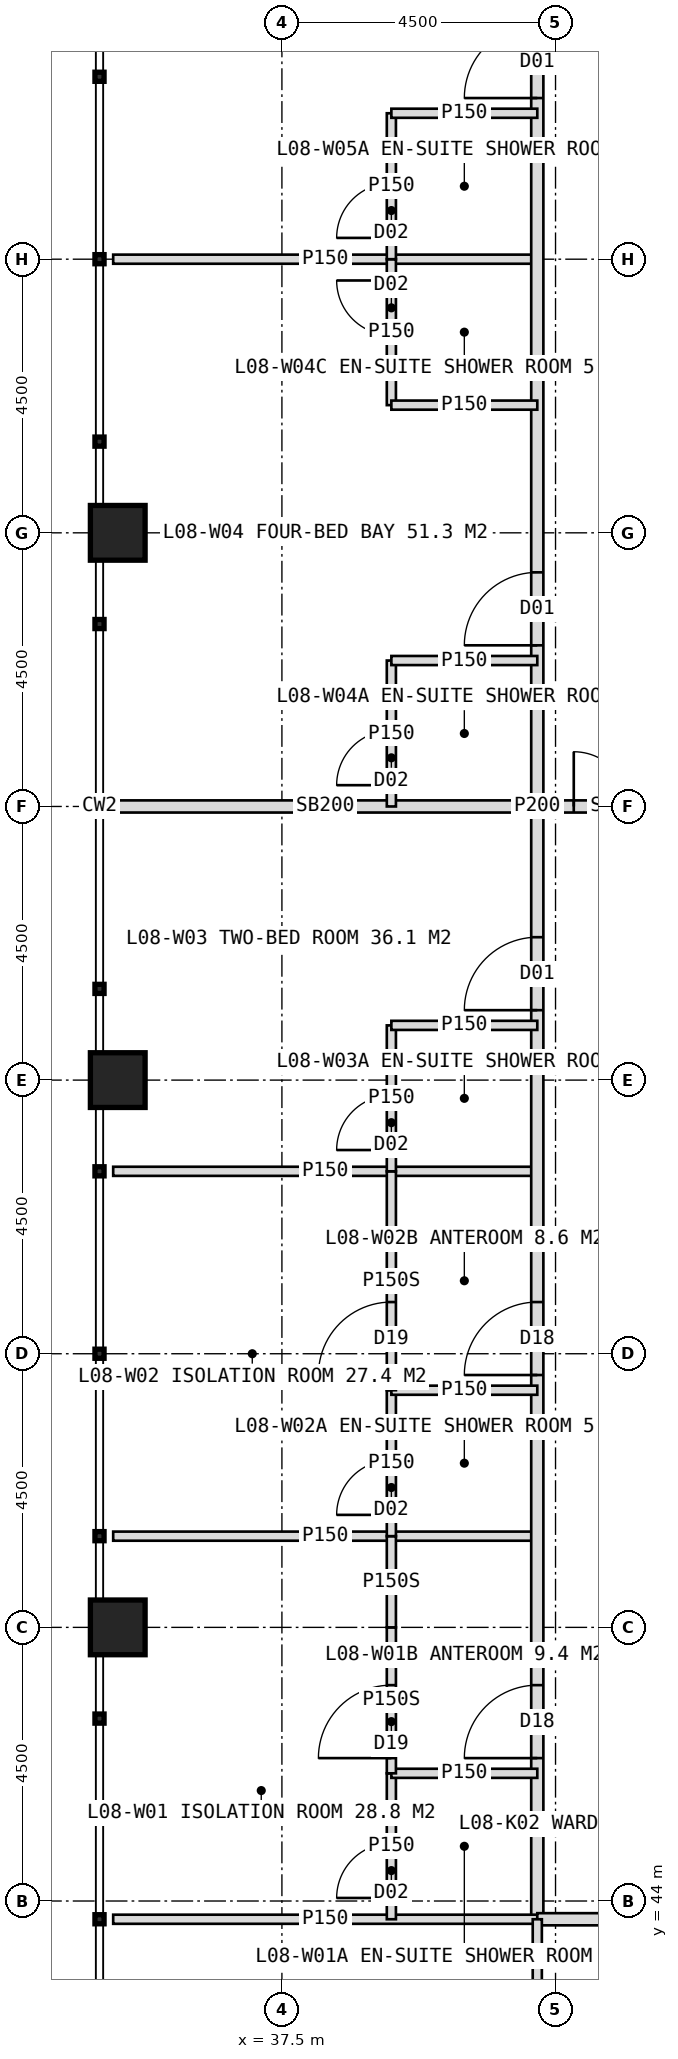
"""IFC4 building model, lengths in metres.
Left out: names, types, materials, properties, quantities, classifications, styles, units other than length and angle.
Written with IfcOpenShell. Run it as: python <this file> out.ifc"""

import sys

from ifc_helpers import new_model, si_unit, direction, frame, frame_2d, origin, origin_2d, place, context, subcontext, project, spatial, rectangle, hollow_rectangle, extrude, element, fill, save


model = new_model("IFC4")
c1 = context("Model", 3, precision=1e-05, world=origin(), true_north=direction((0.0, 1.0)))
c2 = subcontext(c1, "Body", "Model", "MODEL_VIEW")
j1 = project(units=[si_unit("LENGTHUNIT", "METRE"), si_unit("PLANEANGLEUNIT", "RADIAN")], contexts=[c1])
p1 = place(None, origin())
s1 = spatial("IfcSite", under=j1, at=p1, CompositionType="ELEMENT")
p2 = place(p1, origin())
s2 = spatial("IfcBuilding", under=s1, at=p2, CompositionType="ELEMENT")
p3 = place(p2, frame((0.0, 0.0, 39.0)))
s3 = spatial("IfcBuildingStorey", under=s2, at=p3, CompositionType="ELEMENT", Elevation=39.0)
for number, where, z_axis, x_axis in (
    (1, (34.8, 48.5, 0.0), (0.0, 0.0, 1.0), (1.0, 0.0, 0.0)),
    (2, (34.8, 57.5, 0.0), (0.0, 0.0, 1.0), (1.0, 0.0, 0.0)),
    (3, (34.8, 66.5, 0.0), (0.0, 0.0, 1.0), (1.0, 0.0, 0.0)),
):
    element("IfcColumn", number, at=place(p3, frame(where, z_axis=z_axis, x_axis=x_axis)), inside=s3, PredefinedType="COLUMN", context=c2, shape_type="SweptSolid", body=[
        extrude(hollow_rectangle(XDim=0.9, YDim=0.9, WallThickness=0.08, at=origin_2d()), origin(), (0.0, 0.0, 1.0), 4.0),
    ])
for number, where, z_axis, x_axis in (
    (4, (41.7, 50.0, 0.0), (0.0, 0.0, 1.0), (-1.0, 0.0, 0.0)),
    (5, (41.7, 56.0, 0.0), (0.0, 0.0, 1.0), (-1.0, 0.0, 0.0)),
):
    element("IfcWall", number, at=place(p3, frame(where, z_axis=z_axis, x_axis=x_axis)), inside=s3, PredefinedType="PARTITIONING", context=c2, shape_type="SweptSolid", body=[
        extrude(rectangle(XDim=6.975, YDim=0.15, at=frame_2d((3.487, 0.0))), origin(), (0.0, 0.0, 1.0), 3.75),
    ])
p4 = place(p3, frame((41.7, 62.0, 0.0), z_axis=(0.0, 0.0, 1.0), x_axis=(-1.0, 0.0, 0.0)))
e6 = element("IfcWall", 6, at=p4, inside=s3, PredefinedType="SOLIDWALL", context=c2, shape_type="SweptSolid", body=[
    extrude(rectangle(XDim=6.975, YDim=0.2, at=frame_2d((3.487, 0.0))), origin(), (0.0, 0.0, 1.0), 2.75),
])
p5 = place(p3, frame((41.7, 71.0, 0.0), z_axis=(0.0, 0.0, 1.0), x_axis=(-1.0, 0.0, 0.0)))
e7 = element("IfcWall", 7, at=p5, inside=s3, PredefinedType="PARTITIONING", context=c2, shape_type="SweptSolid", body=[
    extrude(rectangle(XDim=6.975, YDim=0.15, at=frame_2d((3.487, 0.0))), origin(), (0.0, 0.0, 1.0), 3.75),
])
p6 = place(p3, frame((41.7, 43.7, 0.0), z_axis=(0.0, 0.0, 1.0), x_axis=(0.0, 1.0, 0.0)))
e8 = element("IfcWall", 8, at=p6, inside=s3, PredefinedType="PARTITIONING", context=c2, shape_type="SweptSolid", body=[
    extrude(rectangle(XDim=36.6, YDim=0.2, at=frame_2d((18.3, 0.0))), origin(), (0.0, 0.0, 1.0), 3.75),
])
p7 = place(p6, frame((2.65, 0.0, 0.0)))
e9 = element("IfcOpeningElement", 9, at=p7, cuts=e8, PredefinedType="OPENING", context=c2, shape_type="SweptSolid", body=[
    extrude(rectangle(XDim=1.2, YDim=2.2, at=frame_2d((0.6, 1.1))), frame((0.0, 0.11, 0.0), z_axis=(0.0, -1.0, 0.0), x_axis=(1.0, 0.0, 0.0)), (0.0, 0.0, 1.0), 0.22),
])
p8 = place(p6, frame((8.95, 0.0, 0.0)))
e10 = element("IfcOpeningElement", 10, at=p8, cuts=e8, PredefinedType="OPENING", context=c2, shape_type="SweptSolid", body=[
    extrude(rectangle(XDim=1.2, YDim=2.2, at=frame_2d((0.6, 1.1))), frame((0.0, 0.11, 0.0), z_axis=(0.0, -1.0, 0.0), x_axis=(1.0, 0.0, 0.0)), (0.0, 0.0, 1.0), 0.22),
])
p9 = place(p6, frame((14.95, 0.0, 0.0)))
e11 = element("IfcOpeningElement", 11, at=p9, cuts=e8, PredefinedType="OPENING", context=c2, shape_type="SweptSolid", body=[
    extrude(rectangle(XDim=1.2, YDim=2.2, at=frame_2d((0.6, 1.1))), frame((0.0, 0.11, 0.0), z_axis=(0.0, -1.0, 0.0), x_axis=(1.0, 0.0, 0.0)), (0.0, 0.0, 1.0), 0.22),
])
p10 = place(p6, frame((20.95, 0.0, 0.0)))
e12 = element("IfcOpeningElement", 12, at=p10, cuts=e8, PredefinedType="OPENING", context=c2, shape_type="SweptSolid", body=[
    extrude(rectangle(XDim=1.2, YDim=2.2, at=frame_2d((0.6, 1.1))), frame((0.0, 0.11, 0.0), z_axis=(0.0, -1.0, 0.0), x_axis=(1.0, 0.0, 0.0)), (0.0, 0.0, 1.0), 0.22),
])
p11 = place(p6, frame((29.95, 0.0, 0.0)))
e13 = element("IfcOpeningElement", 13, at=p11, cuts=e8, PredefinedType="OPENING", context=c2, shape_type="SweptSolid", body=[
    extrude(rectangle(XDim=1.2, YDim=2.2, at=frame_2d((0.6, 1.1))), frame((0.0, 0.11, 0.0), z_axis=(0.0, -1.0, 0.0), x_axis=(1.0, 0.0, 0.0)), (0.0, 0.0, 1.0), 0.22),
])
p12 = place(p3, frame((41.7, 43.7, 0.0), z_axis=(0.0, 0.0, 1.0), x_axis=(-1.0, 0.0, 0.0)))
e14 = element("IfcWall", 14, at=p12, inside=s3, PredefinedType="PARTITIONING", context=c2, shape_type="SweptSolid", body=[
    extrude(rectangle(XDim=6.975, YDim=0.15, at=frame_2d((3.487, 0.0))), origin(), (0.0, 0.0, 1.0), 3.75),
])
p13 = place(p3, frame((39.3, 43.7, 0.0), z_axis=(0.0, 0.0, 1.0), x_axis=(0.0, 1.0, 0.0)))
e15 = element("IfcWall", 15, at=p13, inside=s3, PredefinedType="PARTITIONING", context=c2, shape_type="SweptSolid", body=[
    extrude(rectangle(XDim=2.4, YDim=0.15, at=frame_2d((1.2, 0.0))), origin(), (0.0, 0.0, 1.0), 2.95),
])
p14 = place(p13, frame((0.35, 0.0, 0.0)))
e16 = element("IfcOpeningElement", 16, at=p14, cuts=e15, PredefinedType="OPENING", context=c2, shape_type="SweptSolid", body=[
    extrude(rectangle(XDim=0.9, YDim=2.1, at=frame_2d((0.45, 1.05))), frame((0.0, 0.085, 0.0), z_axis=(0.0, -1.0, 0.0), x_axis=(1.0, 0.0, 0.0)), (0.0, 0.0, 1.0), 0.17),
])
p15 = place(p3, frame((41.7, 46.1, 0.0), z_axis=(0.0, 0.0, 1.0), x_axis=(-1.0, 0.0, 0.0)))
e17 = element("IfcWall", 17, at=p15, inside=s3, PredefinedType="PARTITIONING", context=c2, shape_type="SweptSolid", body=[
    extrude(rectangle(XDim=2.4, YDim=0.15, at=frame_2d((1.2, 0.0))), origin(), (0.0, 0.0, 1.0), 3.75),
])
p16 = place(p3, frame((39.3, 46.1, 0.0), z_axis=(0.0, 0.0, 1.0), x_axis=(0.0, 1.0, 0.0)))
e18 = element("IfcWall", 18, at=p16, inside=s3, PredefinedType="PARTITIONING", context=c2, shape_type="SweptSolid", body=[
    extrude(rectangle(XDim=2.4, YDim=0.15, at=frame_2d((1.2, 0.0))), origin(), (0.0, 0.0, 1.0), 2.95),
])
p17 = place(p16, frame((0.25, 0.0, 0.0)))
e19 = element("IfcOpeningElement", 19, at=p17, cuts=e18, PredefinedType="OPENING", context=c2, shape_type="SweptSolid", body=[
    extrude(rectangle(XDim=1.2, YDim=2.2, at=frame_2d((0.6, 1.1))), frame((0.0, 0.085, 0.0), z_axis=(0.0, -1.0, 0.0), x_axis=(1.0, 0.0, 0.0)), (0.0, 0.0, 1.0), 0.17),
])
p18 = place(p3, frame((39.3, 48.5, 0.0), z_axis=(0.0, 0.0, 1.0), x_axis=(0.0, 1.0, 0.0)))
e20 = element("IfcWall", 20, at=p18, inside=s3, PredefinedType="PARTITIONING", context=c2, shape_type="SweptSolid", body=[
    extrude(rectangle(XDim=1.5, YDim=0.15, at=frame_2d((0.75, 0.0))), origin(), (0.0, 0.0, 1.0), 3.75),
])
p19 = place(p3, frame((39.3, 50.0, 0.0), z_axis=(0.0, 0.0, 1.0), x_axis=(0.0, 1.0, 0.0)))
e21 = element("IfcWall", 21, at=p19, inside=s3, PredefinedType="PARTITIONING", context=c2, shape_type="SweptSolid", body=[
    extrude(rectangle(XDim=2.4, YDim=0.15, at=frame_2d((1.2, 0.0))), origin(), (0.0, 0.0, 1.0), 3.75),
])
p20 = place(p19, frame((0.35, 0.0, 0.0)))
e22 = element("IfcOpeningElement", 22, at=p20, cuts=e21, PredefinedType="OPENING", context=c2, shape_type="SweptSolid", body=[
    extrude(rectangle(XDim=0.9, YDim=2.1, at=frame_2d((0.45, 1.05))), frame((0.0, 0.085, 0.0), z_axis=(0.0, -1.0, 0.0), x_axis=(1.0, 0.0, 0.0)), (0.0, 0.0, 1.0), 0.17),
])
p21 = place(p3, frame((41.7, 52.4, 0.0), z_axis=(0.0, 0.0, 1.0), x_axis=(-1.0, 0.0, 0.0)))
e23 = element("IfcWall", 23, at=p21, inside=s3, PredefinedType="PARTITIONING", context=c2, shape_type="SweptSolid", body=[
    extrude(rectangle(XDim=2.4, YDim=0.15, at=frame_2d((1.2, 0.0))), origin(), (0.0, 0.0, 1.0), 3.75),
])
p22 = place(p3, frame((39.3, 52.4, 0.0), z_axis=(0.0, 0.0, 1.0), x_axis=(0.0, 1.0, 0.0)))
e24 = element("IfcWall", 24, at=p22, inside=s3, PredefinedType="PARTITIONING", context=c2, shape_type="SweptSolid", body=[
    extrude(rectangle(XDim=3.6, YDim=0.15, at=frame_2d((1.8, 0.0))), origin(), (0.0, 0.0, 1.0), 3.75),
])
p23 = place(p22, frame((0.25, 0.0, 0.0)))
e25 = element("IfcOpeningElement", 25, at=p23, cuts=e24, PredefinedType="OPENING", context=c2, shape_type="SweptSolid", body=[
    extrude(rectangle(XDim=1.2, YDim=2.2, at=frame_2d((0.6, 1.1))), frame((0.0, 0.085, 0.0), z_axis=(0.0, -1.0, 0.0), x_axis=(1.0, 0.0, 0.0)), (0.0, 0.0, 1.0), 0.17),
])
p24 = place(p3, frame((39.3, 56.0, 0.0), z_axis=(0.0, 0.0, 1.0), x_axis=(0.0, 1.0, 0.0)))
e26 = element("IfcWall", 26, at=p24, inside=s3, PredefinedType="PARTITIONING", context=c2, shape_type="SweptSolid", body=[
    extrude(rectangle(XDim=2.4, YDim=0.15, at=frame_2d((1.2, 0.0))), origin(), (0.0, 0.0, 1.0), 3.75),
])
p25 = place(p24, frame((0.35, 0.0, 0.0)))
e27 = element("IfcOpeningElement", 27, at=p25, cuts=e26, PredefinedType="OPENING", context=c2, shape_type="SweptSolid", body=[
    extrude(rectangle(XDim=0.9, YDim=2.1, at=frame_2d((0.45, 1.05))), frame((0.0, 0.085, 0.0), z_axis=(0.0, -1.0, 0.0), x_axis=(1.0, 0.0, 0.0)), (0.0, 0.0, 1.0), 0.17),
])
p26 = place(p3, frame((41.7, 58.4, 0.0), z_axis=(0.0, 0.0, 1.0), x_axis=(-1.0, 0.0, 0.0)))
e28 = element("IfcWall", 28, at=p26, inside=s3, PredefinedType="PARTITIONING", context=c2, shape_type="SweptSolid", body=[
    extrude(rectangle(XDim=2.4, YDim=0.15, at=frame_2d((1.2, 0.0))), origin(), (0.0, 0.0, 1.0), 3.75),
])
p27 = place(p3, frame((39.3, 62.0, 0.0), z_axis=(0.0, 0.0, 1.0), x_axis=(0.0, 1.0, 0.0)))
e29 = element("IfcWall", 29, at=p27, inside=s3, PredefinedType="PARTITIONING", context=c2, shape_type="SweptSolid", body=[
    extrude(rectangle(XDim=2.4, YDim=0.15, at=frame_2d((1.2, 0.0))), origin(), (0.0, 0.0, 1.0), 3.75),
])
p28 = place(p27, frame((0.35, 0.0, 0.0)))
e30 = element("IfcOpeningElement", 30, at=p28, cuts=e29, PredefinedType="OPENING", context=c2, shape_type="SweptSolid", body=[
    extrude(rectangle(XDim=0.9, YDim=2.1, at=frame_2d((0.45, 1.05))), frame((0.0, 0.085, 0.0), z_axis=(0.0, -1.0, 0.0), x_axis=(1.0, 0.0, 0.0)), (0.0, 0.0, 1.0), 0.17),
])
p29 = place(p3, frame((41.7, 64.4, 0.0), z_axis=(0.0, 0.0, 1.0), x_axis=(-1.0, 0.0, 0.0)))
e31 = element("IfcWall", 31, at=p29, inside=s3, PredefinedType="PARTITIONING", context=c2, shape_type="SweptSolid", body=[
    extrude(rectangle(XDim=2.4, YDim=0.15, at=frame_2d((1.2, 0.0))), origin(), (0.0, 0.0, 1.0), 3.75),
])
p30 = place(p3, frame((39.3, 68.6, 0.0), z_axis=(0.0, 0.0, 1.0), x_axis=(0.0, 1.0, 0.0)))
e32 = element("IfcWall", 32, at=p30, inside=s3, PredefinedType="PARTITIONING", context=c2, shape_type="SweptSolid", body=[
    extrude(rectangle(XDim=2.4, YDim=0.15, at=frame_2d((1.2, 0.0))), origin(), (0.0, 0.0, 1.0), 3.75),
])
p31 = place(p30, frame((1.15, 0.0, 0.0)))
e33 = element("IfcOpeningElement", 33, at=p31, cuts=e32, PredefinedType="OPENING", context=c2, shape_type="SweptSolid", body=[
    extrude(rectangle(XDim=0.9, YDim=2.1, at=frame_2d((0.45, 1.05))), frame((0.0, 0.085, 0.0), z_axis=(0.0, -1.0, 0.0), x_axis=(1.0, 0.0, 0.0)), (0.0, 0.0, 1.0), 0.17),
])
p32 = place(p3, frame((41.7, 68.6, 0.0), z_axis=(0.0, 0.0, 1.0), x_axis=(-1.0, 0.0, 0.0)))
e34 = element("IfcWall", 34, at=p32, inside=s3, PredefinedType="PARTITIONING", context=c2, shape_type="SweptSolid", body=[
    extrude(rectangle(XDim=2.4, YDim=0.15, at=frame_2d((1.2, 0.0))), origin(), (0.0, 0.0, 1.0), 3.75),
])
p33 = place(p3, frame((39.3, 71.0, 0.0), z_axis=(0.0, 0.0, 1.0), x_axis=(0.0, 1.0, 0.0)))
e35 = element("IfcWall", 35, at=p33, inside=s3, PredefinedType="PARTITIONING", context=c2, shape_type="SweptSolid", body=[
    extrude(rectangle(XDim=2.4, YDim=0.15, at=frame_2d((1.2, 0.0))), origin(), (0.0, 0.0, 1.0), 3.75),
])
p34 = place(p33, frame((0.35, 0.0, 0.0)))
e36 = element("IfcOpeningElement", 36, at=p34, cuts=e35, PredefinedType="OPENING", context=c2, shape_type="SweptSolid", body=[
    extrude(rectangle(XDim=0.9, YDim=2.1, at=frame_2d((0.45, 1.05))), frame((0.0, 0.085, 0.0), z_axis=(0.0, -1.0, 0.0), x_axis=(1.0, 0.0, 0.0)), (0.0, 0.0, 1.0), 0.17),
])
p35 = place(p3, frame((41.7, 73.4, 0.0), z_axis=(0.0, 0.0, 1.0), x_axis=(-1.0, 0.0, 0.0)))
e37 = element("IfcWall", 37, at=p35, inside=s3, PredefinedType="PARTITIONING", context=c2, shape_type="SweptSolid", body=[
    extrude(rectangle(XDim=2.4, YDim=0.15, at=frame_2d((1.2, 0.0))), origin(), (0.0, 0.0, 1.0), 3.75),
])
p36 = place(p3, frame((78.3, 43.7, 0.0), z_axis=(0.0, 0.0, 1.0), x_axis=(-1.0, 0.0, 0.0)))
e38 = element("IfcWall", 38, at=p36, inside=s3, PredefinedType="PARTITIONING", context=c2, shape_type="SweptSolid", body=[
    extrude(rectangle(XDim=36.6, YDim=0.2, at=frame_2d((18.3, 0.0))), origin(), (0.0, 0.0, 1.0), 3.75),
])
p37 = place(p36, frame((2.65, 0.0, 0.0)))
e39 = element("IfcOpeningElement", 39, at=p37, cuts=e38, PredefinedType="OPENING", context=c2, shape_type="SweptSolid", body=[
    extrude(rectangle(XDim=1.2, YDim=2.2, at=frame_2d((0.6, 1.1))), frame((0.0, 0.11, 0.0), z_axis=(0.0, -1.0, 0.0), x_axis=(1.0, 0.0, 0.0)), (0.0, 0.0, 1.0), 0.22),
])
p38 = place(p36, frame((11.95, 0.0, 0.0)))
e40 = element("IfcOpeningElement", 40, at=p38, cuts=e38, PredefinedType="OPENING", context=c2, shape_type="SweptSolid", body=[
    extrude(rectangle(XDim=1.2, YDim=2.2, at=frame_2d((0.6, 1.1))), frame((0.0, 0.11, 0.0), z_axis=(0.0, -1.0, 0.0), x_axis=(1.0, 0.0, 0.0)), (0.0, 0.0, 1.0), 0.22),
])
p39 = place(p36, frame((20.95, 0.0, 0.0)))
e41 = element("IfcOpeningElement", 41, at=p39, cuts=e38, PredefinedType="OPENING", context=c2, shape_type="SweptSolid", body=[
    extrude(rectangle(XDim=1.2, YDim=2.2, at=frame_2d((0.6, 1.1))), frame((0.0, 0.11, 0.0), z_axis=(0.0, -1.0, 0.0), x_axis=(1.0, 0.0, 0.0)), (0.0, 0.0, 1.0), 0.22),
])
p40 = place(p36, frame((29.95, 0.0, 0.0)))
e42 = element("IfcOpeningElement", 42, at=p40, cuts=e38, PredefinedType="OPENING", context=c2, shape_type="SweptSolid", body=[
    extrude(rectangle(XDim=1.2, YDim=2.2, at=frame_2d((0.6, 1.1))), frame((0.0, 0.11, 0.0), z_axis=(0.0, -1.0, 0.0), x_axis=(1.0, 0.0, 0.0)), (0.0, 0.0, 1.0), 0.22),
])
p41 = place(p3, frame((41.7, 43.7, 0.0), z_axis=(0.0, 0.0, 1.0), x_axis=(0.0, -1.0, 0.0)))
e43 = element("IfcWall", 43, at=p41, inside=s3, PredefinedType="PARTITIONING", context=c2, shape_type="SweptSolid", body=[
    extrude(rectangle(XDim=2.4, YDim=0.15, at=frame_2d((1.2, 0.0))), origin(), (0.0, 0.0, 1.0), 3.75),
])
p42 = place(p3, frame((44.4, 62.0, 0.0), z_axis=(0.0, 0.0, 1.0), x_axis=(-1.0, 0.0, 0.0)))
e44 = element("IfcWall", 44, at=p42, inside=s3, PredefinedType="SOLIDWALL", context=c2, shape_type="SweptSolid", body=[
    extrude(rectangle(XDim=2.7, YDim=0.2, at=frame_2d((1.35, 0.0))), origin(), (0.0, 0.0, 1.0), 2.75),
])
p43 = place(p42, frame((0.3, 0.0, 0.0)))
e45 = element("IfcOpeningElement", 45, at=p43, cuts=e44, PredefinedType="OPENING", context=c2, shape_type="SweptSolid", body=[
    extrude(rectangle(XDim=1.8, YDim=2.2, at=frame_2d((0.9, 1.1))), frame((0.0, 0.11, 0.0), z_axis=(0.0, -1.0, 0.0), x_axis=(1.0, 0.0, 0.0)), (0.0, 0.0, 1.0), 0.22),
])
p44 = place(p17, origin())
e46 = element("IfcDoor", 46, at=p44, inside=s3, OperationType="SINGLE_SWING_LEFT", PredefinedType="DOOR", context=c2, shape_type="SweptSolid", body=[
    extrude(rectangle(XDim=1.2, YDim=2.2, at=frame_2d((0.6, 1.1))), frame((0.0, 0.025, 0.0), z_axis=(0.0, -1.0, 0.0), x_axis=(1.0, 0.0, 0.0)), (0.0, 0.0, 1.0), 0.05),
])
fill(e19, e46)
p45 = place(p7, origin())
e47 = element("IfcDoor", 47, at=p45, inside=s3, OperationType="SINGLE_SWING_LEFT", PredefinedType="DOOR", context=c2, shape_type="SweptSolid", body=[
    extrude(rectangle(XDim=1.2, YDim=2.2, at=frame_2d((0.6, 1.1))), frame((0.0, 0.025, 0.0), z_axis=(0.0, -1.0, 0.0), x_axis=(1.0, 0.0, 0.0)), (0.0, 0.0, 1.0), 0.05),
])
fill(e9, e47)
p46 = place(p14, origin())
e48 = element("IfcDoor", 48, at=p46, inside=s3, OperationType="SINGLE_SWING_LEFT", PredefinedType="DOOR", context=c2, shape_type="SweptSolid", body=[
    extrude(rectangle(XDim=0.9, YDim=2.1, at=frame_2d((0.45, 1.05))), frame((0.0, 0.025, 0.0), z_axis=(0.0, -1.0, 0.0), x_axis=(1.0, 0.0, 0.0)), (0.0, 0.0, 1.0), 0.05),
])
fill(e16, e48)
p47 = place(p23, origin())
e49 = element("IfcDoor", 49, at=p47, inside=s3, OperationType="SINGLE_SWING_LEFT", PredefinedType="DOOR", context=c2, shape_type="SweptSolid", body=[
    extrude(rectangle(XDim=1.2, YDim=2.2, at=frame_2d((0.6, 1.1))), frame((0.0, 0.025, 0.0), z_axis=(0.0, -1.0, 0.0), x_axis=(1.0, 0.0, 0.0)), (0.0, 0.0, 1.0), 0.05),
])
fill(e25, e49)
p48 = place(p8, origin())
e50 = element("IfcDoor", 50, at=p48, inside=s3, OperationType="SINGLE_SWING_LEFT", PredefinedType="DOOR", context=c2, shape_type="SweptSolid", body=[
    extrude(rectangle(XDim=1.2, YDim=2.2, at=frame_2d((0.6, 1.1))), frame((0.0, 0.025, 0.0), z_axis=(0.0, -1.0, 0.0), x_axis=(1.0, 0.0, 0.0)), (0.0, 0.0, 1.0), 0.05),
])
fill(e10, e50)
p49 = place(p20, origin())
e51 = element("IfcDoor", 51, at=p49, inside=s3, OperationType="SINGLE_SWING_LEFT", PredefinedType="DOOR", context=c2, shape_type="SweptSolid", body=[
    extrude(rectangle(XDim=0.9, YDim=2.1, at=frame_2d((0.45, 1.05))), frame((0.0, 0.025, 0.0), z_axis=(0.0, -1.0, 0.0), x_axis=(1.0, 0.0, 0.0)), (0.0, 0.0, 1.0), 0.05),
])
fill(e22, e51)
p50 = place(p9, origin())
e52 = element("IfcDoor", 52, at=p50, inside=s3, OperationType="SINGLE_SWING_LEFT", PredefinedType="DOOR", context=c2, shape_type="SweptSolid", body=[
    extrude(rectangle(XDim=1.2, YDim=2.2, at=frame_2d((0.6, 1.1))), frame((0.0, 0.025, 0.0), z_axis=(0.0, -1.0, 0.0), x_axis=(1.0, 0.0, 0.0)), (0.0, 0.0, 1.0), 0.05),
])
fill(e11, e52)
p51 = place(p25, origin())
e53 = element("IfcDoor", 53, at=p51, inside=s3, OperationType="SINGLE_SWING_LEFT", PredefinedType="DOOR", context=c2, shape_type="SweptSolid", body=[
    extrude(rectangle(XDim=0.9, YDim=2.1, at=frame_2d((0.45, 1.05))), frame((0.0, 0.025, 0.0), z_axis=(0.0, -1.0, 0.0), x_axis=(1.0, 0.0, 0.0)), (0.0, 0.0, 1.0), 0.05),
])
fill(e27, e53)
p52 = place(p10, origin())
e54 = element("IfcDoor", 54, at=p52, inside=s3, OperationType="SINGLE_SWING_LEFT", PredefinedType="DOOR", context=c2, shape_type="SweptSolid", body=[
    extrude(rectangle(XDim=1.2, YDim=2.2, at=frame_2d((0.6, 1.1))), frame((0.0, 0.025, 0.0), z_axis=(0.0, -1.0, 0.0), x_axis=(1.0, 0.0, 0.0)), (0.0, 0.0, 1.0), 0.05),
])
fill(e12, e54)
p53 = place(p28, origin())
e55 = element("IfcDoor", 55, at=p53, inside=s3, OperationType="SINGLE_SWING_LEFT", PredefinedType="DOOR", context=c2, shape_type="SweptSolid", body=[
    extrude(rectangle(XDim=0.9, YDim=2.1, at=frame_2d((0.45, 1.05))), frame((0.0, 0.025, 0.0), z_axis=(0.0, -1.0, 0.0), x_axis=(1.0, 0.0, 0.0)), (0.0, 0.0, 1.0), 0.05),
])
fill(e30, e55)
p54 = place(p31, origin())
e56 = element("IfcDoor", 56, at=p54, inside=s3, OperationType="SINGLE_SWING_RIGHT", PredefinedType="DOOR", context=c2, shape_type="SweptSolid", body=[
    extrude(rectangle(XDim=0.9, YDim=2.1, at=frame_2d((0.45, 1.05))), frame((0.0, 0.025, 0.0), z_axis=(0.0, -1.0, 0.0), x_axis=(1.0, 0.0, 0.0)), (0.0, 0.0, 1.0), 0.05),
])
fill(e33, e56)
p55 = place(p11, origin())
e57 = element("IfcDoor", 57, at=p55, inside=s3, OperationType="SINGLE_SWING_LEFT", PredefinedType="DOOR", context=c2, shape_type="SweptSolid", body=[
    extrude(rectangle(XDim=1.2, YDim=2.2, at=frame_2d((0.6, 1.1))), frame((0.0, 0.025, 0.0), z_axis=(0.0, -1.0, 0.0), x_axis=(1.0, 0.0, 0.0)), (0.0, 0.0, 1.0), 0.05),
])
fill(e13, e57)
p56 = place(p34, origin())
e58 = element("IfcDoor", 58, at=p56, inside=s3, OperationType="SINGLE_SWING_LEFT", PredefinedType="DOOR", context=c2, shape_type="SweptSolid", body=[
    extrude(rectangle(XDim=0.9, YDim=2.1, at=frame_2d((0.45, 1.05))), frame((0.0, 0.025, 0.0), z_axis=(0.0, -1.0, 0.0), x_axis=(1.0, 0.0, 0.0)), (0.0, 0.0, 1.0), 0.05),
])
fill(e36, e58)
p57 = place(p43, origin())
e59 = element("IfcDoor", 59, at=p57, inside=s3, OperationType="DOUBLE_DOOR_DOUBLE_SWING", PredefinedType="DOOR", context=c2, shape_type="SweptSolid", body=[
    extrude(rectangle(XDim=1.8, YDim=2.2, at=frame_2d((0.9, 1.1))), frame((0.0, 0.025, 0.0), z_axis=(0.0, -1.0, 0.0), x_axis=(1.0, 0.0, 0.0)), (0.0, 0.0, 1.0), 0.05),
])
fill(e45, e59)
save(model, sys.argv[1])
